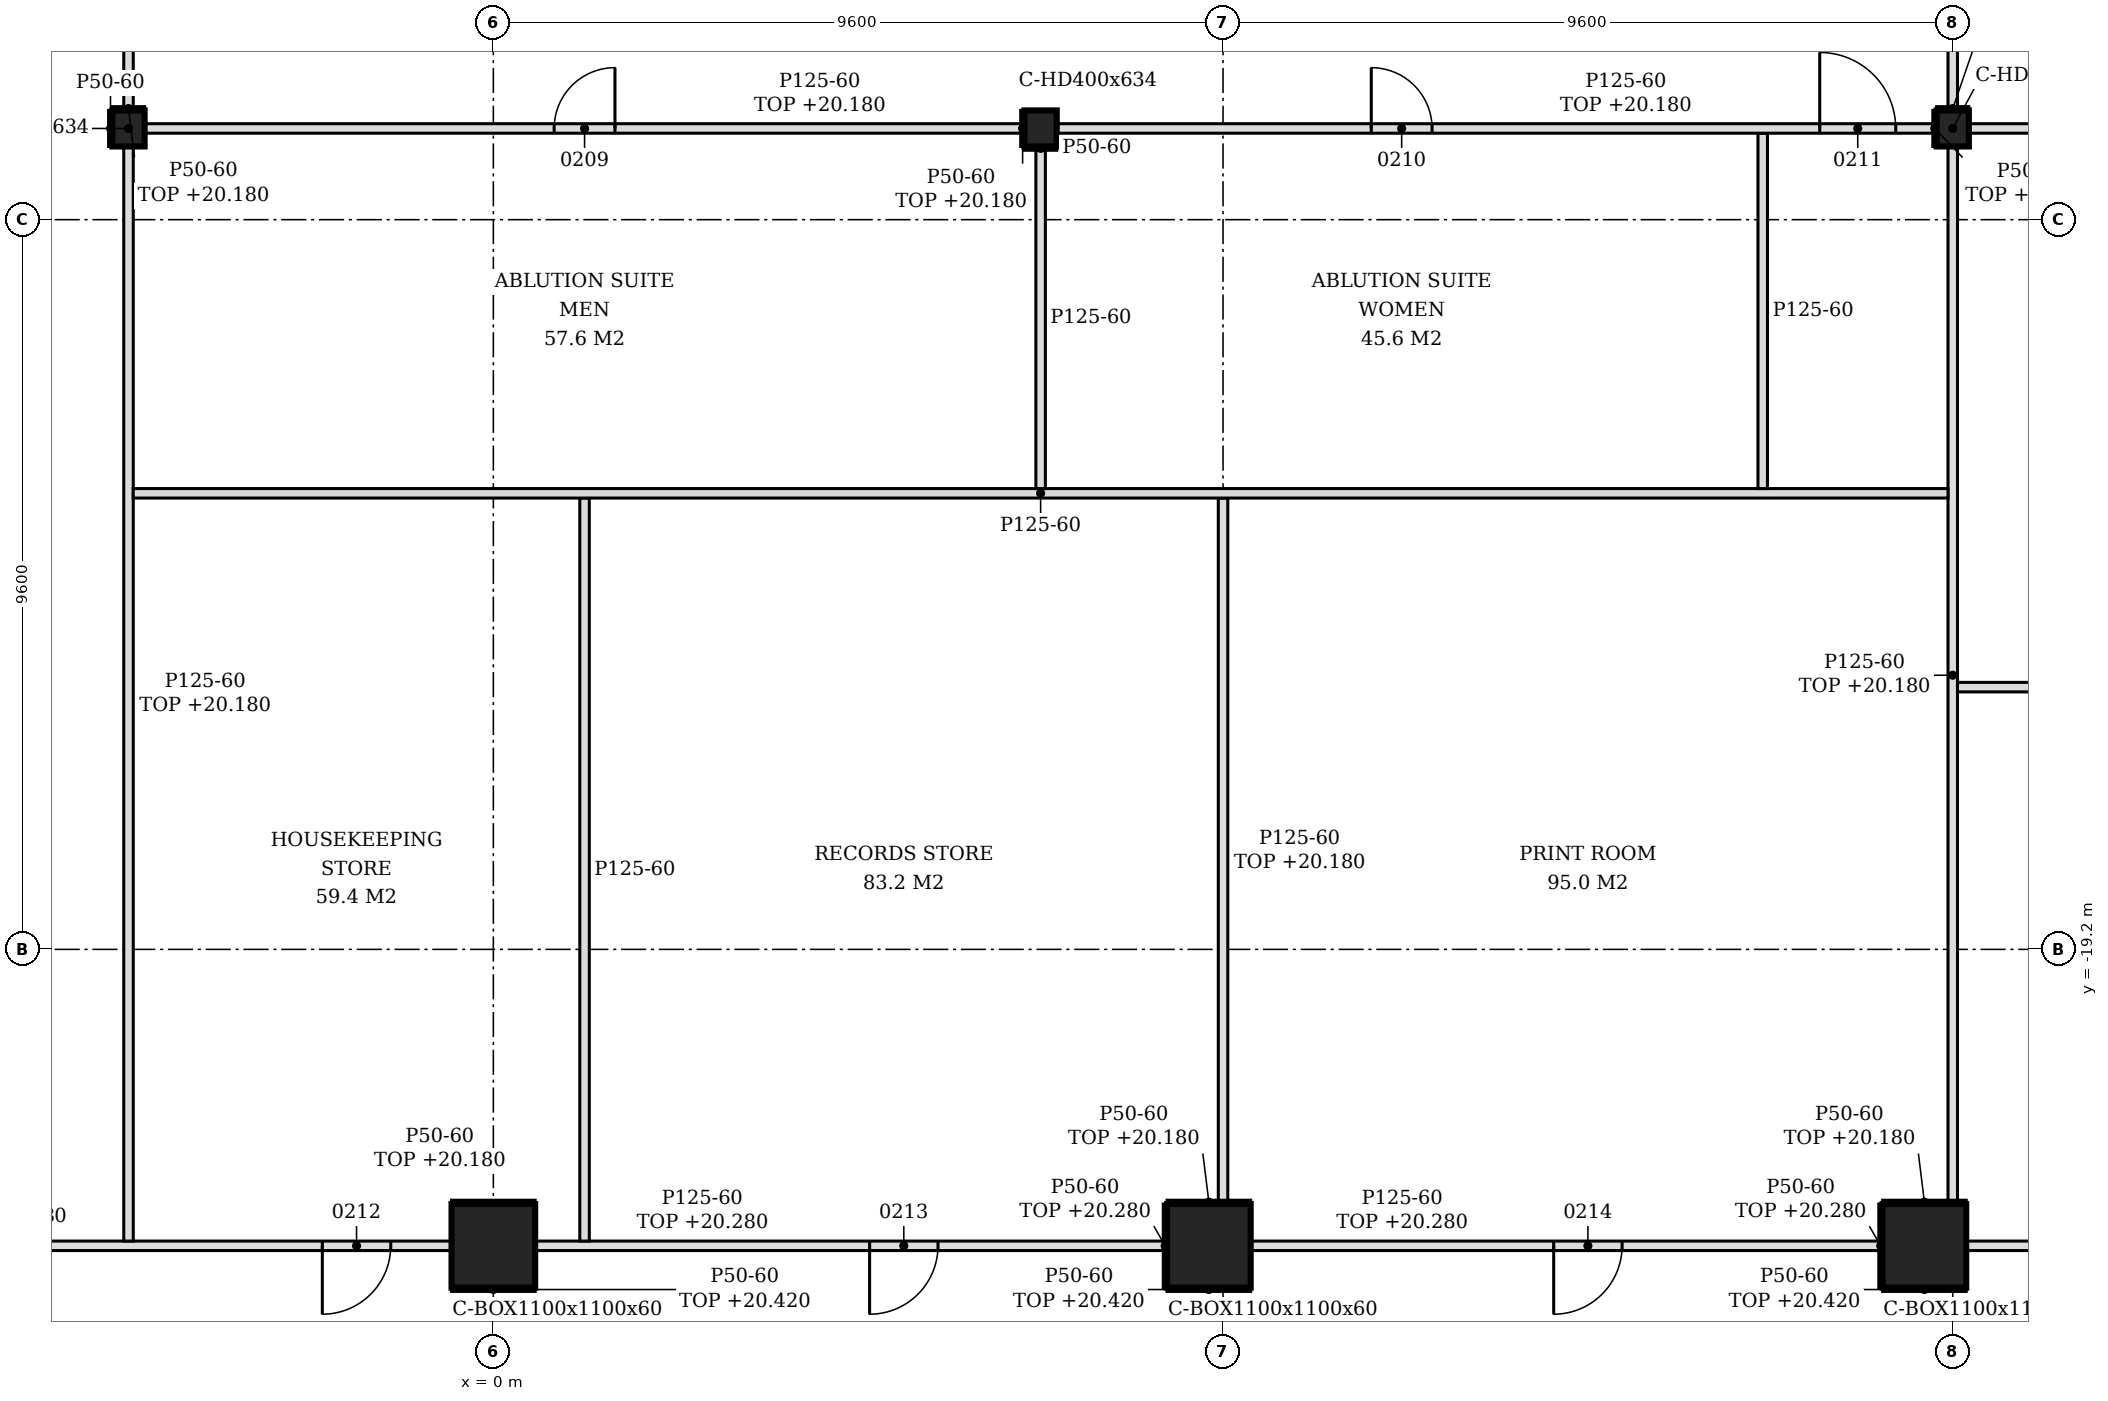
"""IFC4 building model, lengths in metres.
Left out: names, types, materials, properties, quantities, classifications, styles, units other than length and angle.
Written with IfcOpenShell. Run it as: python <this file> out.ifc"""

import sys

from ifc_helpers import new_model, si_unit, direction, frame, frame_2d, origin, origin_2d, place, context, subcontext, project, spatial, polyline, rectangle, hollow_rectangle, i_section, outline, extrude, element, fill, save


model = new_model("IFC4")
c1 = context("Model", 3, precision=1e-05, world=origin(), true_north=direction((0.0, 1.0)))
c2 = subcontext(c1, "Body", "Model", "MODEL_VIEW")
j1 = project(units=[si_unit("LENGTHUNIT", "METRE"), si_unit("PLANEANGLEUNIT", "RADIAN")], contexts=[c1])
p1 = place(None, origin())
s1 = spatial("IfcSite", under=j1, at=p1, CompositionType="ELEMENT")
p2 = place(p1, origin())
s2 = spatial("IfcBuilding", under=s1, at=p2, CompositionType="ELEMENT")
p3 = place(p2, frame((0.0, 0.0, 15.0)))
s3 = spatial("IfcBuildingStorey", under=s2, at=p3, CompositionType="ELEMENT", Elevation=15.0)
for number, where, z_axis, x_axis in (
    (1, (0.0, -23.1, -0.2), (0.0, 0.0, 1.0), (1.0, 0.0, 0.0)),
    (2, (9.414, -23.1, -0.2), (0.0, 0.0, 1.0), (1.0, 0.0, 0.0)),
    (3, (18.827, -23.1, -0.2), (0.0, 0.0, 1.0), (1.0, 0.0, 0.0)),
):
    element("IfcColumn", number, at=place(p3, frame(where, z_axis=z_axis, x_axis=x_axis)), inside=s3, PredefinedType="COLUMN", context=c2, shape_type="SweptSolid", body=[
        extrude(hollow_rectangle(XDim=1.1, YDim=1.1, WallThickness=0.06, at=origin_2d()), origin(), (0.0, 0.0, 1.0), 6.0),
    ])
for number, where, z_axis, x_axis in (
    (4, (-4.8, -8.4, -0.2), (0.0, 0.0, 1.0), (1.0, 0.0, 0.0)),
    (5, (7.2, -8.4, -0.2), (0.0, 0.0, 1.0), (1.0, 0.0, 0.0)),
    (6, (19.2, -8.4, -0.2), (0.0, 0.0, 1.0), (1.0, 0.0, 0.0)),
):
    element("IfcColumn", number, at=place(p3, frame(where, z_axis=z_axis, x_axis=x_axis)), inside=s3, PredefinedType="COLUMN", context=c2, shape_type="SweptSolid", body=[
        extrude(i_section(OverallWidth=0.424, OverallDepth=0.474, WebThickness=0.048, FlangeThickness=0.077, FilletRadius=0.015, at=origin_2d()), origin(), (0.0, 0.0, 1.0), 6.0),
    ])
p4 = place(p3, frame((-8.864, -23.1, 0.0), z_axis=(0.0, 0.0, 1.0), x_axis=(1.0, 0.0, 0.0)))
e7 = element("IfcWall", 7, at=p4, inside=s3, PredefinedType="PARTITIONING", context=c2, shape_type="SweptSolid", body=[
    extrude(rectangle(XDim=8.313, YDim=0.125, at=frame_2d((4.157, 0.0))), origin(), (0.0, 0.0, 1.0), 5.28),
])
p5 = place(p4, frame((6.614, 0.0, 0.0)))
e8 = element("IfcOpeningElement", 8, at=p5, cuts=e7, PredefinedType="OPENING", context=c2, shape_type="SweptSolid", body=[
    extrude(rectangle(XDim=0.9, YDim=2.1, at=frame_2d((0.45, 1.05))), frame((0.0, 0.073, 0.0), z_axis=(0.0, -1.0, 0.0), x_axis=(1.0, 0.0, 0.0)), (0.0, 0.0, 1.0), 0.145),
])
p6 = place(p3, frame((0.55, -23.1, 0.0), z_axis=(0.0, 0.0, 1.0), x_axis=(1.0, 0.0, 0.0)))
e9 = element("IfcWall", 9, at=p6, inside=s3, PredefinedType="PARTITIONING", context=c2, shape_type="SweptSolid", body=[
    extrude(rectangle(XDim=8.313, YDim=0.125, at=frame_2d((4.157, 0.0))), origin(), (0.0, 0.0, 1.0), 5.28),
])
p7 = place(p6, frame((4.4, 0.0, 0.0)))
e10 = element("IfcOpeningElement", 10, at=p7, cuts=e9, PredefinedType="OPENING", context=c2, shape_type="SweptSolid", body=[
    extrude(rectangle(XDim=0.9, YDim=2.1, at=frame_2d((0.45, 1.05))), frame((0.0, 0.073, 0.0), z_axis=(0.0, -1.0, 0.0), x_axis=(1.0, 0.0, 0.0)), (0.0, 0.0, 1.0), 0.145),
])
p8 = place(p3, frame((9.964, -23.1, 0.0), z_axis=(0.0, 0.0, 1.0), x_axis=(1.0, 0.0, 0.0)))
e11 = element("IfcWall", 11, at=p8, inside=s3, PredefinedType="PARTITIONING", context=c2, shape_type="SweptSolid", body=[
    extrude(rectangle(XDim=8.313, YDim=0.125, at=frame_2d((4.157, 0.0))), origin(), (0.0, 0.0, 1.0), 5.28),
])
p9 = place(p8, frame((3.986, 0.0, 0.0)))
e12 = element("IfcOpeningElement", 12, at=p9, cuts=e11, PredefinedType="OPENING", context=c2, shape_type="SweptSolid", body=[
    extrude(rectangle(XDim=0.9, YDim=2.1, at=frame_2d((0.45, 1.05))), frame((0.0, 0.073, 0.0), z_axis=(0.0, -1.0, 0.0), x_axis=(1.0, 0.0, 0.0)), (0.0, 0.0, 1.0), 0.145),
])
p10 = place(p3, frame((19.377, -23.1, 0.0), z_axis=(0.0, 0.0, 1.0), x_axis=(1.0, 0.0, 0.0)))
e13 = element("IfcWall", 13, at=p10, inside=s3, PredefinedType="PARTITIONING", context=c2, shape_type="SweptSolid", body=[
    extrude(rectangle(XDim=8.585, YDim=0.125, at=frame_2d((4.292, 0.0))), origin(), (0.0, 0.0, 1.0), 5.8),
])
p11 = place(p3, frame((-4.8, -23.038, 0.0), z_axis=(0.0, 0.0, 1.0), x_axis=(0.0, 1.0, 0.0)))
e14 = element("IfcWall", 14, at=p11, inside=s3, PredefinedType="PARTITIONING", context=c2, shape_type="SweptSolid", body=[
    extrude(rectangle(XDim=14.401, YDim=0.125, at=frame_2d((7.2, 0.0))), origin(), (0.0, 0.0, 1.0), 5.18),
])
p12 = place(p3, frame((1.2, -23.038, 0.0), z_axis=(0.0, 0.0, 1.0), x_axis=(0.0, 1.0, 0.0)))
e15 = element("IfcWall", 15, at=p12, inside=s3, PredefinedType="PARTITIONING", context=c2, shape_type="SweptSolid", body=[
    extrude(outline(polyline([(0.0, 0.0), (9.775, 0.0), (9.775, 5.8), (0.087, 5.8), (0.085, 5.28), (0.0, 5.28), (0.0, 0.0)])), frame((0.0, 0.062, 0.0), z_axis=(0.0, -1.0, 0.0), x_axis=(1.0, 0.0, 0.0)), (0.0, 0.0, 1.0), 0.125),
])
p13 = place(p3, frame((9.6, -22.55, 0.0), z_axis=(0.0, 0.0, 1.0), x_axis=(0.0, 1.0, 0.0)))
e16 = element("IfcWall", 16, at=p13, inside=s3, PredefinedType="PARTITIONING", context=c2, shape_type="SweptSolid", body=[
    extrude(rectangle(XDim=9.288, YDim=0.125, at=frame_2d((4.644, 0.0))), origin(), (0.0, 0.0, 1.0), 5.18),
])
p14 = place(p3, frame((19.2, -22.55, 0.0), z_axis=(0.0, 0.0, 1.0), x_axis=(0.0, 1.0, 0.0)))
e17 = element("IfcWall", 17, at=p14, inside=s3, PredefinedType="PARTITIONING", context=c2, shape_type="SweptSolid", body=[
    extrude(rectangle(XDim=13.913, YDim=0.125, at=frame_2d((6.957, 0.0))), origin(), (0.0, 0.0, 1.0), 5.18),
])
p15 = place(p3, frame((19.262, -15.75, 0.0), z_axis=(0.0, 0.0, 1.0), x_axis=(1.0, 0.0, 0.0)))
e18 = element("IfcWall", 18, at=p15, inside=s3, PredefinedType="PARTITIONING", context=c2, shape_type="SweptSolid", body=[
    extrude(outline(polyline([(0.0, 0.0), (8.575, 0.0), (8.575, 5.8), (7.189, 5.8), (7.187, 5.28), (6.64, 5.28), (6.638, 5.8), (0.087, 5.8), (0.085, 5.18), (0.0, 5.18), (0.0, 0.0)])), frame((0.0, 0.062, 0.0), z_axis=(0.0, -1.0, 0.0), x_axis=(1.0, 0.0, 0.0)), (0.0, 0.0, 1.0), 0.125),
])
p16 = place(p3, frame((-4.738, -13.2, 0.0), z_axis=(0.0, 0.0, 1.0), x_axis=(1.0, 0.0, 0.0)))
e19 = element("IfcWall", 19, at=p16, inside=s3, PredefinedType="PARTITIONING", context=c2, shape_type="SweptSolid", body=[
    extrude(outline(polyline([(0.0, 0.0), (23.875, 0.0), (23.875, 5.18), (23.788, 5.18), (23.785, 5.8), (19.288, 5.8), (19.285, 5.18), (18.988, 5.18), (18.986, 5.8), (14.488, 5.8), (14.486, 5.18), (14.188, 5.18), (14.186, 5.8), (9.688, 5.8), (9.686, 5.18), (9.387, 5.18), (9.385, 5.8), (4.887, 5.8), (4.885, 5.18), (4.587, 5.18), (4.585, 5.8), (0.087, 5.8), (0.085, 5.18), (0.0, 5.18), (0.0, 0.0)])), frame((0.0, 0.062, 0.0), z_axis=(0.0, -1.0, 0.0), x_axis=(1.0, 0.0, 0.0)), (0.0, 0.0, 1.0), 0.125),
])
p17 = place(p3, frame((7.2, -13.137, 0.0), z_axis=(0.0, 0.0, 1.0), x_axis=(0.0, 1.0, 0.0)))
e20 = element("IfcWall", 20, at=p17, inside=s3, PredefinedType="PARTITIONING", context=c2, shape_type="SweptSolid", body=[
    extrude(rectangle(XDim=4.5, YDim=0.125, at=frame_2d((2.25, 0.0))), origin(), (0.0, 0.0, 1.0), 5.8),
])
p18 = place(p3, frame((16.7, -13.137, 0.0), z_axis=(0.0, 0.0, 1.0), x_axis=(0.0, 1.0, 0.0)))
e21 = element("IfcWall", 21, at=p18, inside=s3, PredefinedType="PARTITIONING", context=c2, shape_type="SweptSolid", body=[
    extrude(outline(polyline([(0.0, 0.0), (4.675, 0.0), (4.675, 5.18), (4.587, 5.18), (4.585, 5.8), (0.0, 5.8), (0.0, 0.0)])), frame((0.0, 0.062, 0.0), z_axis=(0.0, -1.0, 0.0), x_axis=(1.0, 0.0, 0.0)), (0.0, 0.0, 1.0), 0.125),
])
p19 = place(p3, frame((-4.588, -8.4, 0.0), z_axis=(0.0, 0.0, 1.0), x_axis=(1.0, 0.0, 0.0)))
e22 = element("IfcWall", 22, at=p19, inside=s3, PredefinedType="PARTITIONING", context=c2, shape_type="SweptSolid", body=[
    extrude(rectangle(XDim=11.576, YDim=0.125, at=frame_2d((5.788, 0.0))), origin(), (0.0, 0.0, 1.0), 5.18),
])
p20 = place(p19, frame((5.388, 0.0, 0.0)))
e23 = element("IfcOpeningElement", 23, at=p20, cuts=e22, PredefinedType="OPENING", context=c2, shape_type="SweptSolid", body=[
    extrude(rectangle(XDim=0.8, YDim=2.1, at=frame_2d((0.4, 1.05))), frame((0.0, 0.073, 0.0), z_axis=(0.0, -1.0, 0.0), x_axis=(1.0, 0.0, 0.0)), (0.0, 0.0, 1.0), 0.145),
])
p21 = place(p3, frame((7.412, -8.4, 0.0), z_axis=(0.0, 0.0, 1.0), x_axis=(1.0, 0.0, 0.0)))
e24 = element("IfcWall", 24, at=p21, inside=s3, PredefinedType="PARTITIONING", context=c2, shape_type="SweptSolid", body=[
    extrude(rectangle(XDim=11.576, YDim=0.125, at=frame_2d((5.788, 0.0))), origin(), (0.0, 0.0, 1.0), 5.18),
])
p22 = place(p21, frame((4.138, 0.0, 0.0)))
e25 = element("IfcOpeningElement", 25, at=p22, cuts=e24, PredefinedType="OPENING", context=c2, shape_type="SweptSolid", body=[
    extrude(rectangle(XDim=0.8, YDim=2.1, at=frame_2d((0.4, 1.05))), frame((0.0, 0.073, 0.0), z_axis=(0.0, -1.0, 0.0), x_axis=(1.0, 0.0, 0.0)), (0.0, 0.0, 1.0), 0.145),
])
p23 = place(p21, frame((10.038, 0.0, 0.0)))
e26 = element("IfcOpeningElement", 26, at=p23, cuts=e24, PredefinedType="OPENING", context=c2, shape_type="SweptSolid", body=[
    extrude(rectangle(XDim=1.0, YDim=2.1, at=frame_2d((0.5, 1.05))), frame((0.0, 0.073, 0.0), z_axis=(0.0, -1.0, 0.0), x_axis=(1.0, 0.0, 0.0)), (0.0, 0.0, 1.0), 0.145),
])
p24 = place(p3, frame((19.412, -8.4, 0.0), z_axis=(0.0, 0.0, 1.0), x_axis=(1.0, 0.0, 0.0)))
e27 = element("IfcWall", 27, at=p24, inside=s3, PredefinedType="PARTITIONING", context=c2, shape_type="SweptSolid", body=[
    extrude(outline(polyline([(0.0, 0.0), (8.425, 0.0), (8.426, 5.28), (8.338, 5.28), (8.336, 5.8), (0.0, 5.8), (0.0, 0.0)])), frame((0.0, 0.062, 0.0), z_axis=(0.0, -1.0, 0.0), x_axis=(1.0, 0.0, 0.0)), (0.0, 0.0, 1.0), 0.125),
])
for number, where, z_axis, x_axis in (
    (28, (-4.8, -8.163, 0.0), (0.0, 0.0, 1.0), (0.0, 1.0, 0.0)),
    (29, (19.2, -8.163, 0.0), (0.0, 0.0, 1.0), (0.0, 1.0, 0.0)),
):
    element("IfcWall", number, at=place(p3, frame(where, z_axis=z_axis, x_axis=x_axis)), inside=s3, PredefinedType="PARTITIONING", context=c2, shape_type="SweptSolid", body=[
        extrude(rectangle(XDim=10.326, YDim=0.125, at=frame_2d((5.163, 0.0))), origin(), (0.0, 0.0, 1.0), 5.18),
    ])
p25 = place(p3, frame((-0.55, -22.525, 0.0), z_axis=(0.0, 0.0, 1.0), x_axis=(1.0, 0.0, 0.0)))
e30 = element("IfcWall", 30, at=p25, inside=s3, PredefinedType="PARTITIONING", context=c2, shape_type="SweptSolid", body=[
    extrude(rectangle(XDim=1.1, YDim=0.05, at=frame_2d((0.55, 0.0))), origin(), (0.0, 0.0, 1.0), 5.18),
])
p26 = place(p3, frame((-0.55, -23.675, 0.0), z_axis=(0.0, 0.0, 1.0), x_axis=(1.0, 0.0, 0.0)))
e31 = element("IfcWall", 31, at=p26, inside=s3, PredefinedType="PARTITIONING", context=c2, shape_type="SweptSolid", body=[
    extrude(rectangle(XDim=1.1, YDim=0.05, at=frame_2d((0.55, 0.0))), origin(), (0.0, 0.0, 1.0), 5.42),
])
p27 = place(p3, frame((8.864, -22.525, 0.0), z_axis=(0.0, 0.0, 1.0), x_axis=(1.0, 0.0, 0.0)))
e32 = element("IfcWall", 32, at=p27, inside=s3, PredefinedType="PARTITIONING", context=c2, shape_type="SweptSolid", body=[
    extrude(rectangle(XDim=1.1, YDim=0.05, at=frame_2d((0.55, 0.0))), origin(), (0.0, 0.0, 1.0), 5.18),
])
p28 = place(p3, frame((8.864, -23.675, 0.0), z_axis=(0.0, 0.0, 1.0), x_axis=(1.0, 0.0, 0.0)))
e33 = element("IfcWall", 33, at=p28, inside=s3, PredefinedType="PARTITIONING", context=c2, shape_type="SweptSolid", body=[
    extrude(rectangle(XDim=1.1, YDim=0.05, at=frame_2d((0.55, 0.0))), origin(), (0.0, 0.0, 1.0), 5.42),
])
p29 = place(p3, frame((18.277, -22.525, 0.0), z_axis=(0.0, 0.0, 1.0), x_axis=(1.0, 0.0, 0.0)))
e34 = element("IfcWall", 34, at=p29, inside=s3, PredefinedType="PARTITIONING", context=c2, shape_type="SweptSolid", body=[
    extrude(rectangle(XDim=1.1, YDim=0.05, at=frame_2d((0.55, 0.0))), origin(), (0.0, 0.0, 1.0), 5.18),
])
p30 = place(p3, frame((18.277, -23.675, 0.0), z_axis=(0.0, 0.0, 1.0), x_axis=(1.0, 0.0, 0.0)))
e35 = element("IfcWall", 35, at=p30, inside=s3, PredefinedType="PARTITIONING", context=c2, shape_type="SweptSolid", body=[
    extrude(rectangle(XDim=1.1, YDim=0.05, at=frame_2d((0.55, 0.0))), origin(), (0.0, 0.0, 1.0), 5.42),
])
p31 = place(p3, frame((-5.037, -8.637, 0.0), z_axis=(0.0, 0.0, 1.0), x_axis=(0.0, 1.0, 0.0)))
e36 = element("IfcWall", 36, at=p31, inside=s3, PredefinedType="PARTITIONING", context=c2, shape_type="SweptSolid", body=[
    extrude(rectangle(XDim=0.474, YDim=0.05, at=frame_2d((0.237, 0.0))), origin(), (0.0, 0.0, 1.0), 5.8),
])
for number, where, z_axis, x_axis in (
    (37, (8.839, -23.65, 0.0), (0.0, 0.0, 1.0), (0.0, 1.0, 0.0)),
    (38, (18.252, -23.65, 0.0), (0.0, 0.0, 1.0), (0.0, 1.0, 0.0)),
):
    element("IfcWall", number, at=place(p3, frame(where, z_axis=z_axis, x_axis=x_axis)), inside=s3, PredefinedType="PARTITIONING", context=c2, shape_type="SweptSolid", body=[
        extrude(rectangle(XDim=1.1, YDim=0.05, at=frame_2d((0.55, 0.0))), origin(), (0.0, 0.0, 1.0), 5.28),
    ])
for number, where, z_axis, x_axis in (
    (39, (18.963, -8.637, 0.0), (0.0, 0.0, 1.0), (0.0, 1.0, 0.0)),
    (40, (6.963, -8.637, 0.0), (0.0, 0.0, 1.0), (0.0, 1.0, 0.0)),
):
    element("IfcWall", number, at=place(p3, frame(where, z_axis=z_axis, x_axis=x_axis)), inside=s3, PredefinedType="PARTITIONING", context=c2, shape_type="SweptSolid", body=[
        extrude(rectangle(XDim=0.474, YDim=0.05, at=frame_2d((0.237, 0.0))), origin(), (0.0, 0.0, 1.0), 5.18),
    ])
p32 = place(p3, frame((-5.012, -8.138, 0.0), z_axis=(0.0, 0.0, 1.0), x_axis=(1.0, 0.0, 0.0)))
e41 = element("IfcWall", 41, at=p32, inside=s3, PredefinedType="PARTITIONING", context=c2, shape_type="SweptSolid", body=[
    extrude(rectangle(XDim=0.424, YDim=0.05, at=frame_2d((0.212, 0.0))), origin(), (0.0, 0.0, 1.0), 5.18),
])
p33 = place(p3, frame((6.988, -8.662, 0.0), z_axis=(0.0, 0.0, 1.0), x_axis=(1.0, 0.0, 0.0)))
e42 = element("IfcWall", 42, at=p33, inside=s3, PredefinedType="PARTITIONING", context=c2, shape_type="SweptSolid", body=[
    extrude(rectangle(XDim=0.424, YDim=0.05, at=frame_2d((0.212, 0.0))), origin(), (0.0, 0.0, 1.0), 5.8),
])
p34 = place(p3, frame((18.988, -8.138, 0.0), z_axis=(0.0, 0.0, 1.0), x_axis=(1.0, 0.0, 0.0)))
e43 = element("IfcWall", 43, at=p34, inside=s3, PredefinedType="PARTITIONING", context=c2, shape_type="SweptSolid", body=[
    extrude(rectangle(XDim=0.424, YDim=0.05, at=frame_2d((0.212, 0.0))), origin(), (0.0, 0.0, 1.0), 5.18),
])
p35 = place(p20, origin())
e44 = element("IfcDoor", 44, at=p35, inside=s3, OperationType="SINGLE_SWING_RIGHT", PredefinedType="DOOR", context=c2, shape_type="SweptSolid", body=[
    extrude(rectangle(XDim=0.8, YDim=2.1, at=frame_2d((0.4, 1.05))), frame((0.0, 0.025, 0.0), z_axis=(0.0, -1.0, 0.0), x_axis=(1.0, 0.0, 0.0)), (0.0, 0.0, 1.0), 0.05),
])
fill(e23, e44)
p36 = place(p22, origin())
e45 = element("IfcDoor", 45, at=p36, inside=s3, OperationType="SINGLE_SWING_LEFT", PredefinedType="DOOR", context=c2, shape_type="SweptSolid", body=[
    extrude(rectangle(XDim=0.8, YDim=2.1, at=frame_2d((0.4, 1.05))), frame((0.0, 0.025, 0.0), z_axis=(0.0, -1.0, 0.0), x_axis=(1.0, 0.0, 0.0)), (0.0, 0.0, 1.0), 0.05),
])
fill(e25, e45)
p37 = place(p23, origin())
e46 = element("IfcDoor", 46, at=p37, inside=s3, OperationType="SINGLE_SWING_LEFT", PredefinedType="DOOR", context=c2, shape_type="SweptSolid", body=[
    extrude(rectangle(XDim=1.0, YDim=2.1, at=frame_2d((0.5, 1.05))), frame((0.0, 0.025, 0.0), z_axis=(0.0, -1.0, 0.0), x_axis=(1.0, 0.0, 0.0)), (0.0, 0.0, 1.0), 0.05),
])
fill(e26, e46)
p38 = place(p5, frame((0.9, 0.0, 0.0), z_axis=(0.0, 0.0, 1.0), x_axis=(-1.0, 0.0, 0.0)))
e47 = element("IfcDoor", 47, at=p38, inside=s3, OperationType="SINGLE_SWING_RIGHT", PredefinedType="DOOR", context=c2, shape_type="SweptSolid", body=[
    extrude(rectangle(XDim=0.9, YDim=2.1, at=frame_2d((0.45, 1.05))), frame((0.0, 0.025, 0.0), z_axis=(0.0, -1.0, 0.0), x_axis=(1.0, 0.0, 0.0)), (0.0, 0.0, 1.0), 0.05),
])
fill(e8, e47)
p39 = place(p7, frame((0.9, 0.0, 0.0), z_axis=(0.0, 0.0, 1.0), x_axis=(-1.0, 0.0, 0.0)))
e48 = element("IfcDoor", 48, at=p39, inside=s3, OperationType="SINGLE_SWING_RIGHT", PredefinedType="DOOR", context=c2, shape_type="SweptSolid", body=[
    extrude(rectangle(XDim=0.9, YDim=2.1, at=frame_2d((0.45, 1.05))), frame((0.0, 0.025, 0.0), z_axis=(0.0, -1.0, 0.0), x_axis=(1.0, 0.0, 0.0)), (0.0, 0.0, 1.0), 0.05),
])
fill(e10, e48)
p40 = place(p9, frame((0.9, 0.0, 0.0), z_axis=(0.0, 0.0, 1.0), x_axis=(-1.0, 0.0, 0.0)))
e49 = element("IfcDoor", 49, at=p40, inside=s3, OperationType="SINGLE_SWING_RIGHT", PredefinedType="DOOR", context=c2, shape_type="SweptSolid", body=[
    extrude(rectangle(XDim=0.9, YDim=2.1, at=frame_2d((0.45, 1.05))), frame((0.0, 0.025, 0.0), z_axis=(0.0, -1.0, 0.0), x_axis=(1.0, 0.0, 0.0)), (0.0, 0.0, 1.0), 0.05),
])
fill(e12, e49)
save(model, sys.argv[1])
